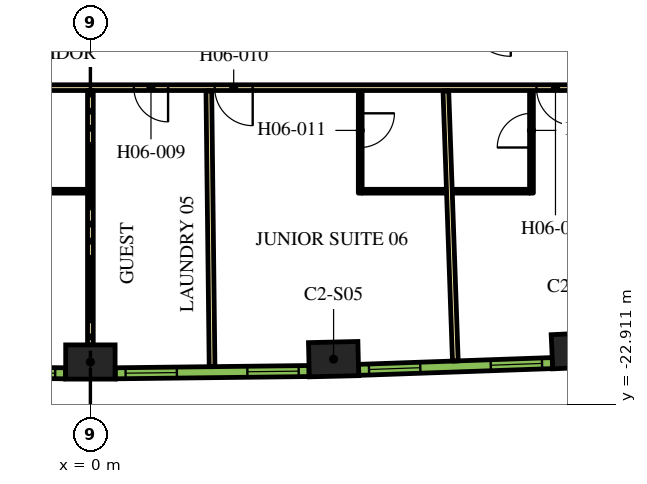
"""IFC4 building model, lengths in metres.
Left out: names, types, materials, properties, quantities, classifications, styles, units other than length and angle.
Written with IfcOpenShell. Run it as: python <this file> out.ifc"""

import sys

from ifc_helpers import new_model, si_unit, direction, frame, frame_2d, origin, origin_2d, place, context, subcontext, project, spatial, rectangle, extrude, element, fill, save


model = new_model("IFC4")
c1 = context("Model", 3, precision=1e-05, world=origin(), true_north=direction((0.0, 1.0)))
c2 = subcontext(c1, "Body", "Model", "MODEL_VIEW")
j1 = project(units=[si_unit("LENGTHUNIT", "METRE"), si_unit("PLANEANGLEUNIT", "RADIAN")], contexts=[c1])
p1 = place(None, origin())
s1 = spatial("IfcSite", under=j1, at=p1, CompositionType="ELEMENT")
p2 = place(p1, origin())
s2 = spatial("IfcBuilding", under=s1, at=p2, CompositionType="ELEMENT")
p3 = place(p2, frame((0.0, 0.0, 91.5)))
s3 = spatial("IfcBuildingStorey", under=s2, at=p3, CompositionType="ELEMENT", Elevation=91.5)
for number, where, z_axis, x_axis in (
    (1, (0.0, -21.794, 0.0), (0.0, 0.0, 1.0), (1.0, 0.0, 0.0)),
    (2, (6.399, -21.719, 0.0), (0.0, 0.0, 1.0), (1.0, 0.023, 0.0)),
    (3, (12.795, -21.494, 0.0), (0.0, 0.0, 1.0), (0.999, 0.047, 0.0)),
):
    element("IfcColumn", number, at=place(p3, frame(where, z_axis=z_axis, x_axis=x_axis)), inside=s3, PredefinedType="COLUMN", context=c2, shape_type="SweptSolid", body=[
        extrude(rectangle(XDim=1.3, YDim=0.9, at=origin_2d()), origin(), (0.0, 0.0, 1.0), 3.9),
    ])
p4 = place(p3, frame((12.918, -14.575, 0.0), z_axis=(0.0, 0.0, 1.0), x_axis=(-1.0, 0.0, 0.0)))
e4 = element("IfcWall", 4, at=p4, inside=s3, PredefinedType="PARTITIONING", context=c2, shape_type="SweptSolid", body=[
    extrude(rectangle(XDim=25.766, YDim=0.15, at=frame_2d((12.883, 0.0))), origin(), (0.0, 0.0, 1.0), 2.75),
])
p5 = place(p4, frame((19.306, 0.0, 0.0)))
e5 = element("IfcOpeningElement", 5, at=p5, cuts=e4, PredefinedType="OPENING", context=c2, shape_type="SweptSolid", body=[
    extrude(rectangle(XDim=1.0, YDim=2.1, at=frame_2d((0.5, 1.05))), frame((0.0, 0.085, 0.0), z_axis=(0.0, -1.0, 0.0), x_axis=(1.0, 0.0, 0.0)), (0.0, 0.0, 1.0), 0.17),
])
p6 = place(p4, frame((17.999, 0.0, 0.0)))
e6 = element("IfcOpeningElement", 6, at=p6, cuts=e4, PredefinedType="OPENING", context=c2, shape_type="SweptSolid", body=[
    extrude(rectangle(XDim=1.0, YDim=2.1, at=frame_2d((0.5, 1.05))), frame((0.0, 0.085, 0.0), z_axis=(0.0, -1.0, 0.0), x_axis=(1.0, 0.0, 0.0)), (0.0, 0.0, 1.0), 0.17),
])
p7 = place(p4, frame((10.874, 0.0, 0.0)))
e7 = element("IfcOpeningElement", 7, at=p7, cuts=e4, PredefinedType="OPENING", context=c2, shape_type="SweptSolid", body=[
    extrude(rectangle(XDim=0.9, YDim=2.1, at=frame_2d((0.45, 1.05))), frame((0.0, 0.085, 0.0), z_axis=(0.0, -1.0, 0.0), x_axis=(1.0, 0.0, 0.0)), (0.0, 0.0, 1.0), 0.17),
])
p8 = place(p4, frame((8.647, 0.0, 0.0)))
e8 = element("IfcOpeningElement", 8, at=p8, cuts=e4, PredefinedType="OPENING", context=c2, shape_type="SweptSolid", body=[
    extrude(rectangle(XDim=1.0, YDim=2.1, at=frame_2d((0.5, 1.05))), frame((0.0, 0.085, 0.0), z_axis=(0.0, -1.0, 0.0), x_axis=(1.0, 0.0, 0.0)), (0.0, 0.0, 1.0), 0.17),
])
p9 = place(p4, frame((0.18, 0.0, 0.0)))
e9 = element("IfcOpeningElement", 9, at=p9, cuts=e4, PredefinedType="OPENING", context=c2, shape_type="SweptSolid", body=[
    extrude(rectangle(XDim=1.0, YDim=2.1, at=frame_2d((0.5, 1.05))), frame((0.0, 0.085, 0.0), z_axis=(0.0, -1.0, 0.0), x_axis=(1.0, 0.0, 0.0)), (0.0, 0.0, 1.0), 0.17),
])
p10 = place(p3, frame((0.0, -21.344, 0.0), z_axis=(0.0, 0.0, 1.0), x_axis=(0.0, 1.0, 0.0)))
e10 = element("IfcWall", 10, at=p10, inside=s3, PredefinedType="PARTITIONING", context=c2, shape_type="SweptSolid", body=[
    extrude(rectangle(XDim=6.694, YDim=0.15, at=frame_2d((3.347, 0.0))), origin(), (0.0, 0.0, 1.0), 2.75),
])
p11 = place(p3, frame((3.202, -21.916, 0.0), z_axis=(0.0, 0.0, 1.0), x_axis=(-0.011707696285, 0.999931462575, 0.0)))
e11 = element("IfcWall", 11, at=p11, inside=s3, PredefinedType="PARTITIONING", context=c2, shape_type="SweptSolid", body=[
    extrude(rectangle(XDim=7.257, YDim=0.15, at=frame_2d((3.628, 0.0))), origin(), (0.0, 0.0, 1.0), 2.75),
])
p12 = place(p3, frame((9.603, -21.767, 0.0), z_axis=(0.0, 0.0, 1.0), x_axis=(-0.035053506859, 0.999385436985, 0.0)))
e12 = element("IfcWall", 12, at=p12, inside=s3, PredefinedType="PARTITIONING", context=c2, shape_type="SweptSolid", body=[
    extrude(rectangle(XDim=7.111, YDim=0.15, at=frame_2d((3.556, 0.0))), origin(), (0.0, 0.0, 1.0), 2.75),
])
p13 = place(p3, frame((-2.276, -17.3, 0.0), z_axis=(0.0, 0.0, 1.0), x_axis=(1.0, 0.0, 0.0)))
e13 = element("IfcWall", 13, at=p13, inside=s3, PredefinedType="PARTITIONING", context=c2, shape_type="SweptSolid", body=[
    extrude(rectangle(XDim=2.2, YDim=0.1, at=frame_2d((1.1, 0.0))), origin(), (0.0, 0.0, 1.0), 2.75),
])
p14 = place(p3, frame((7.1, -14.65, 0.0), z_axis=(0.0, 0.0, 1.0), x_axis=(0.0, -1.0, 0.0)))
e14 = element("IfcWall", 14, at=p14, inside=s3, PredefinedType="PARTITIONING", context=c2, shape_type="SweptSolid", body=[
    extrude(rectangle(XDim=2.7, YDim=0.1, at=frame_2d((1.35, 0.0))), origin(), (0.0, 0.0, 1.0), 2.75),
])
p15 = place(p14, frame((0.6, 0.0, 0.0)))
e15 = element("IfcOpeningElement", 15, at=p15, cuts=e14, PredefinedType="OPENING", context=c2, shape_type="SweptSolid", body=[
    extrude(rectangle(XDim=0.9, YDim=2.1, at=frame_2d((0.45, 1.05))), frame((0.0, 0.06, 0.0), z_axis=(0.0, -1.0, 0.0), x_axis=(1.0, 0.0, 0.0)), (0.0, 0.0, 1.0), 0.12),
])
p16 = place(p3, frame((7.15, -17.3, 0.0), z_axis=(0.0, 0.0, 1.0), x_axis=(1.0, 0.0, 0.0)))
e16 = element("IfcWall", 16, at=p16, inside=s3, PredefinedType="PARTITIONING", context=c2, shape_type="SweptSolid", body=[
    extrude(rectangle(XDim=2.22, YDim=0.1, at=frame_2d((1.11, 0.0))), origin(), (0.0, 0.0, 1.0), 2.75),
])
p17 = place(p3, frame((11.607, -17.35, 0.0), z_axis=(0.0, 0.0, 1.0), x_axis=(0.0, 1.0, 0.0)))
e17 = element("IfcWall", 17, at=p17, inside=s3, PredefinedType="PARTITIONING", context=c2, shape_type="SweptSolid", body=[
    extrude(rectangle(XDim=2.7, YDim=0.1, at=frame_2d((1.35, 0.0))), origin(), (0.0, 0.0, 1.0), 2.75),
])
p18 = place(p17, frame((1.2, 0.0, 0.0)))
e18 = element("IfcOpeningElement", 18, at=p18, cuts=e17, PredefinedType="OPENING", context=c2, shape_type="SweptSolid", body=[
    extrude(rectangle(XDim=0.9, YDim=2.1, at=frame_2d((0.45, 1.05))), frame((0.0, 0.06, 0.0), z_axis=(0.0, -1.0, 0.0), x_axis=(1.0, 0.0, 0.0)), (0.0, 0.0, 1.0), 0.12),
])
p19 = place(p3, frame((11.557, -17.3, 0.0), z_axis=(0.0, 0.0, 1.0), x_axis=(-1.0, 0.0, 0.0)))
e19 = element("IfcWall", 19, at=p19, inside=s3, PredefinedType="PARTITIONING", context=c2, shape_type="SweptSolid", body=[
    extrude(rectangle(XDim=2.03, YDim=0.1, at=frame_2d((1.015, 0.0))), origin(), (0.0, 0.0, 1.0), 2.75),
])
p20 = place(p3, frame((-5.753, -22.031, 0.0), z_axis=(0.0, 0.0, 1.0), x_axis=(0.999931786565, -0.011679992145, 0.0)))
e20 = element("IfcWall", 20, at=p20, inside=s3, PredefinedType="SOLIDWALL", context=c2, shape_type="SweptSolid", body=[
    extrude(rectangle(XDim=5.1, YDim=0.29, at=frame_2d((2.55, 0.0))), origin(), (0.0, 0.0, 1.0), 3.65),
])
p21 = place(p20, frame((0.272, 0.0, 0.9)))
e21 = element("IfcOpeningElement", 21, at=p21, cuts=e20, PredefinedType="OPENING", context=c2, shape_type="SweptSolid", body=[
    extrude(rectangle(XDim=1.35, YDim=2.15, at=frame_2d((0.675, 1.075))), frame((0.0, 0.155, 0.0), z_axis=(0.0, -1.0, 0.0), x_axis=(1.0, 0.0, 0.0)), (0.0, 0.0, 1.0), 0.31),
])
p22 = place(p20, frame((3.478, 0.0, 0.9)))
e22 = element("IfcOpeningElement", 22, at=p22, cuts=e20, PredefinedType="OPENING", context=c2, shape_type="SweptSolid", body=[
    extrude(rectangle(XDim=1.35, YDim=2.15, at=frame_2d((0.675, 1.075))), frame((0.0, 0.155, 0.0), z_axis=(0.0, -1.0, 0.0), x_axis=(1.0, 0.0, 0.0)), (0.0, 0.0, 1.0), 0.31),
])
p23 = place(p3, frame((0.653, -22.091, 0.0), z_axis=(0.0, 0.0, 1.0), x_axis=(0.999931786565, 0.011679992145, 0.0)))
e23 = element("IfcWall", 23, at=p23, inside=s3, PredefinedType="SOLIDWALL", context=c2, shape_type="SweptSolid", body=[
    extrude(rectangle(XDim=5.1, YDim=0.29, at=frame_2d((2.55, 0.0))), origin(), (0.0, 0.0, 1.0), 3.65),
])
p24 = place(p23, frame((0.273, 0.0, 0.9)))
e24 = element("IfcOpeningElement", 24, at=p24, cuts=e23, PredefinedType="OPENING", context=c2, shape_type="SweptSolid", body=[
    extrude(rectangle(XDim=1.35, YDim=2.15, at=frame_2d((0.675, 1.075))), frame((0.0, 0.155, 0.0), z_axis=(0.0, -1.0, 0.0), x_axis=(1.0, 0.0, 0.0)), (0.0, 0.0, 1.0), 0.31),
])
p25 = place(p23, frame((3.478, 0.0, 0.9)))
e25 = element("IfcOpeningElement", 25, at=p25, cuts=e23, PredefinedType="OPENING", context=c2, shape_type="SweptSolid", body=[
    extrude(rectangle(XDim=1.35, YDim=2.15, at=frame_2d((0.675, 1.075))), frame((0.0, 0.155, 0.0), z_axis=(0.0, -1.0, 0.0), x_axis=(1.0, 0.0, 0.0)), (0.0, 0.0, 1.0), 0.31),
])
p26 = place(p3, frame((7.059, -22.001, 0.0), z_axis=(0.0, 0.0, 1.0), x_axis=(0.999385993957, 0.035037623812, 0.0)))
e26 = element("IfcWall", 26, at=p26, inside=s3, PredefinedType="SOLIDWALL", context=c2, shape_type="SweptSolid", body=[
    extrude(rectangle(XDim=5.101, YDim=0.29, at=frame_2d((2.55, 0.0))), origin(), (0.0, 0.0, 1.0), 3.65),
])
p27 = place(p26, frame((0.273, 0.0, 0.9)))
e27 = element("IfcOpeningElement", 27, at=p27, cuts=e26, PredefinedType="OPENING", context=c2, shape_type="SweptSolid", body=[
    extrude(rectangle(XDim=1.35, YDim=2.15, at=frame_2d((0.675, 1.075))), frame((0.0, 0.155, 0.0), z_axis=(0.0, -1.0, 0.0), x_axis=(1.0, 0.0, 0.0)), (0.0, 0.0, 1.0), 0.31),
])
p28 = place(p26, frame((3.478, 0.0, 0.9)))
e28 = element("IfcOpeningElement", 28, at=p28, cuts=e26, PredefinedType="OPENING", context=c2, shape_type="SweptSolid", body=[
    extrude(rectangle(XDim=1.35, YDim=2.15, at=frame_2d((0.675, 1.075))), frame((0.0, 0.155, 0.0), z_axis=(0.0, -1.0, 0.0), x_axis=(1.0, 0.0, 0.0)), (0.0, 0.0, 1.0), 0.31),
])
p29 = place(p7, origin())
e29 = element("IfcDoor", 29, at=p29, inside=s3, OperationType="SINGLE_SWING_LEFT", PredefinedType="DOOR", context=c2, shape_type="SweptSolid", body=[
    extrude(rectangle(XDim=0.9, YDim=2.1, at=frame_2d((0.45, 1.05))), frame((0.0, 0.025, 0.0), z_axis=(0.0, -1.0, 0.0), x_axis=(1.0, 0.0, 0.0)), (0.0, 0.0, 1.0), 0.05),
])
fill(e7, e29)
p30 = place(p8, origin())
e30 = element("IfcDoor", 30, at=p30, inside=s3, OperationType="SINGLE_SWING_RIGHT", PredefinedType="DOOR", context=c2, shape_type="SweptSolid", body=[
    extrude(rectangle(XDim=1.0, YDim=2.1, at=frame_2d((0.5, 1.05))), frame((0.0, 0.025, 0.0), z_axis=(0.0, -1.0, 0.0), x_axis=(1.0, 0.0, 0.0)), (0.0, 0.0, 1.0), 0.05),
])
fill(e8, e30)
p31 = place(p15, origin())
e31 = element("IfcDoor", 31, at=p31, inside=s3, OperationType="SINGLE_SWING_RIGHT", PredefinedType="DOOR", context=c2, shape_type="SweptSolid", body=[
    extrude(rectangle(XDim=0.9, YDim=2.1, at=frame_2d((0.45, 1.05))), frame((0.0, 0.025, 0.0), z_axis=(0.0, -1.0, 0.0), x_axis=(1.0, 0.0, 0.0)), (0.0, 0.0, 1.0), 0.05),
])
fill(e15, e31)
p32 = place(p9, origin())
e32 = element("IfcDoor", 32, at=p32, inside=s3, OperationType="SINGLE_SWING_LEFT", PredefinedType="DOOR", context=c2, shape_type="SweptSolid", body=[
    extrude(rectangle(XDim=1.0, YDim=2.1, at=frame_2d((0.5, 1.05))), frame((0.0, 0.025, 0.0), z_axis=(0.0, -1.0, 0.0), x_axis=(1.0, 0.0, 0.0)), (0.0, 0.0, 1.0), 0.05),
])
fill(e9, e32)
p33 = place(p18, origin())
e33 = element("IfcDoor", 33, at=p33, inside=s3, OperationType="SINGLE_SWING_LEFT", PredefinedType="DOOR", context=c2, shape_type="SweptSolid", body=[
    extrude(rectangle(XDim=0.9, YDim=2.1, at=frame_2d((0.45, 1.05))), frame((0.0, 0.025, 0.0), z_axis=(0.0, -1.0, 0.0), x_axis=(1.0, 0.0, 0.0)), (0.0, 0.0, 1.0), 0.05),
])
fill(e18, e33)
p34 = place(p22, origin())
e34 = element("IfcWindow", 34, at=p34, inside=s3, PartitioningType="DOUBLE_PANEL_VERTICAL", PredefinedType="WINDOW", context=c2, shape_type="SweptSolid", body=[
    extrude(rectangle(XDim=1.35, YDim=2.15, at=frame_2d((0.675, 1.075))), frame((0.0, 0.015, 0.0), z_axis=(0.0, -1.0, 0.0), x_axis=(1.0, 0.0, 0.0)), (0.0, 0.0, 1.0), 0.06),
])
fill(e22, e34)
p35 = place(p24, origin())
e35 = element("IfcWindow", 35, at=p35, inside=s3, PartitioningType="DOUBLE_PANEL_VERTICAL", PredefinedType="WINDOW", context=c2, shape_type="SweptSolid", body=[
    extrude(rectangle(XDim=1.35, YDim=2.15, at=frame_2d((0.675, 1.075))), frame((0.0, 0.015, 0.0), z_axis=(0.0, -1.0, 0.0), x_axis=(1.0, 0.0, 0.0)), (0.0, 0.0, 1.0), 0.06),
])
fill(e24, e35)
p36 = place(p25, origin())
e36 = element("IfcWindow", 36, at=p36, inside=s3, PartitioningType="DOUBLE_PANEL_VERTICAL", PredefinedType="WINDOW", context=c2, shape_type="SweptSolid", body=[
    extrude(rectangle(XDim=1.35, YDim=2.15, at=frame_2d((0.675, 1.075))), frame((0.0, 0.015, 0.0), z_axis=(0.0, -1.0, 0.0), x_axis=(1.0, 0.0, 0.0)), (0.0, 0.0, 1.0), 0.06),
])
fill(e25, e36)
p37 = place(p27, origin())
e37 = element("IfcWindow", 37, at=p37, inside=s3, PartitioningType="DOUBLE_PANEL_VERTICAL", PredefinedType="WINDOW", context=c2, shape_type="SweptSolid", body=[
    extrude(rectangle(XDim=1.35, YDim=2.15, at=frame_2d((0.675, 1.075))), frame((0.0, 0.015, 0.0), z_axis=(0.0, -1.0, 0.0), x_axis=(1.0, 0.0, 0.0)), (0.0, 0.0, 1.0), 0.06),
])
fill(e27, e37)
p38 = place(p28, origin())
e38 = element("IfcWindow", 38, at=p38, inside=s3, PartitioningType="DOUBLE_PANEL_VERTICAL", PredefinedType="WINDOW", context=c2, shape_type="SweptSolid", body=[
    extrude(rectangle(XDim=1.35, YDim=2.15, at=frame_2d((0.675, 1.075))), frame((0.0, 0.015, 0.0), z_axis=(0.0, -1.0, 0.0), x_axis=(1.0, 0.0, 0.0)), (0.0, 0.0, 1.0), 0.06),
])
fill(e28, e38)
save(model, sys.argv[1])
